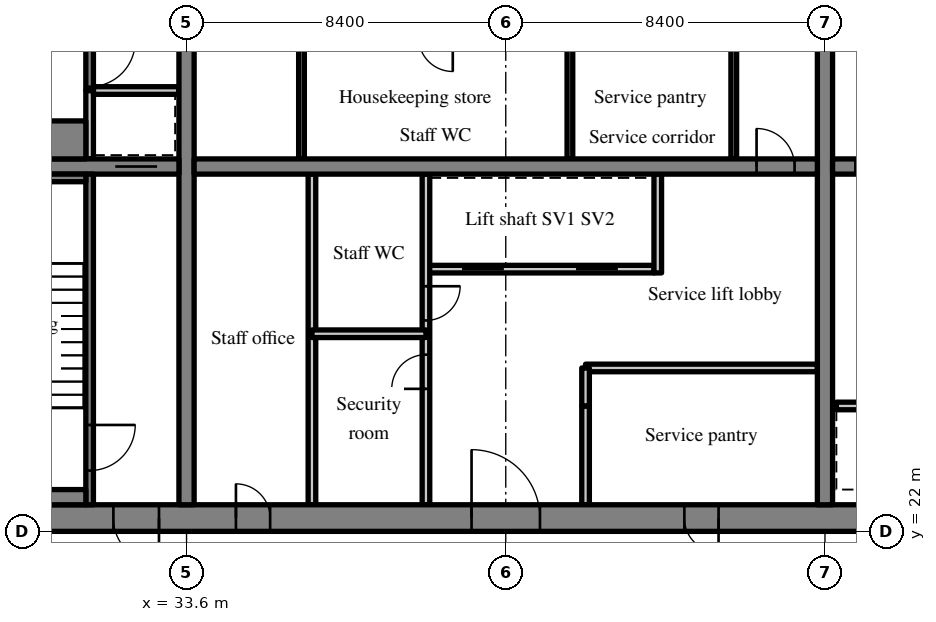
"""IFC4 building model, lengths in metres.
Left out: names, types, materials, properties, quantities, classifications, styles, units other than length and angle.
Written with IfcOpenShell. Run it as: python <this file> out.ifc"""

import sys

from ifc_helpers import new_model, si_unit, direction, frame, frame_2d, origin, place, context, subcontext, project, spatial, rectangle, extrude, source, transform, mapped, element, fill, save


model = new_model("IFC4")
c1 = context("Model", 3, precision=1e-05, world=origin(), true_north=direction((0.0, 1.0)))
c2 = subcontext(c1, "Body", "Model", "MODEL_VIEW")
j1 = project(units=[si_unit("LENGTHUNIT", "METRE"), si_unit("PLANEANGLEUNIT", "RADIAN")], contexts=[c1])
p1 = place(None, origin())
s1 = spatial("IfcSite", under=j1, at=p1, CompositionType="ELEMENT")
p2 = place(p1, origin())
s2 = spatial("IfcBuilding", under=s1, at=p2, CompositionType="ELEMENT")
p3 = place(p2, frame((0.0, 0.0, 185.8)))
s3 = spatial("IfcBuildingStorey", under=s2, at=p3, CompositionType="ELEMENT", Elevation=185.8)
m1 = source(origin(), c2, "Body", "SweptSolid", [
    extrude(rectangle(XDim=50.4, YDim=0.7, at=frame_2d((25.2, 0.0))), origin(), (0.0, 0.0, 1.0), 3.52),
])
p4 = place(p3, frame((25.2, 22.35, 0.0), z_axis=(0.0, 0.0, 1.0), x_axis=(1.0, 0.0, 0.0)))
e1 = element("IfcWall", 1, at=p4, inside=s3, PredefinedType="SHEAR", context=c2, shape_type="MappedRepresentation", body=[
    mapped(m1, transform((0.0, 0.0, 0.0), scale=1.0)),
])
m2 = source(origin(), c2, "Body", "SweptSolid", [
    extrude(rectangle(XDim=1.8, YDim=2.1, at=frame_2d((0.9, 1.05))), frame((0.0, 0.36, 0.0), z_axis=(0.0, -1.0, 0.0), x_axis=(1.0, 0.0, 0.0)), (0.0, 0.0, 1.0), 0.72),
])
p5 = place(p4, frame((15.9, 0.0, 0.0)))
e2 = element("IfcOpeningElement", 2, at=p5, cuts=e1, PredefinedType="OPENING", context=c2, shape_type="MappedRepresentation", body=[
    mapped(m2, transform((0.0, 0.0, 0.0), scale=1.0)),
])
m3 = source(origin(), c2, "Body", "SweptSolid", [
    extrude(rectangle(XDim=0.9, YDim=2.1, at=frame_2d((0.45, 1.05))), frame((0.0, 0.36, 0.0), z_axis=(0.0, -1.0, 0.0), x_axis=(1.0, 0.0, 0.0)), (0.0, 0.0, 1.0), 0.72),
])
p6 = place(p4, frame((9.7, 0.0, 0.0)))
e3 = element("IfcOpeningElement", 3, at=p6, cuts=e1, PredefinedType="OPENING", context=c2, shape_type="MappedRepresentation", body=[
    mapped(m3, transform((0.0, 0.0, 0.0), scale=1.0)),
])
p7 = place(p4, frame((21.5, 0.0, 0.0)))
e4 = element("IfcOpeningElement", 4, at=p7, cuts=e1, PredefinedType="OPENING", context=c2, shape_type="MappedRepresentation", body=[
    mapped(m3, transform((0.0, 0.0, 0.0), scale=1.0)),
])
p8 = place(p4, frame((32.7, 0.0, 0.0)))
e5 = element("IfcOpeningElement", 5, at=p8, cuts=e1, PredefinedType="OPENING", context=c2, shape_type="MappedRepresentation", body=[
    mapped(m2, transform((0.0, 0.0, 0.0), scale=1.0)),
])
m4 = source(origin(), c2, "Body", "SweptSolid", [
    extrude(rectangle(XDim=1.2, YDim=2.1, at=frame_2d((0.6, 1.05))), frame((0.0, 0.36, 0.0), z_axis=(0.0, -1.0, 0.0), x_axis=(1.0, 0.0, 0.0)), (0.0, 0.0, 1.0), 0.72),
])
p9 = place(p4, frame((6.475, 0.0, 0.0)))
e6 = element("IfcOpeningElement", 6, at=p9, cuts=e1, PredefinedType="OPENING", context=c2, shape_type="MappedRepresentation", body=[
    mapped(m4, transform((0.0, 0.0, 0.0), scale=1.0)),
])
p10 = place(p4, frame((47.875, 0.0, 0.0)))
e7 = element("IfcOpeningElement", 7, at=p10, cuts=e1, PredefinedType="OPENING", context=c2, shape_type="MappedRepresentation", body=[
    mapped(m4, transform((0.0, 0.0, 0.0), scale=1.0)),
])
m5 = source(origin(), c2, "Body", "SweptSolid", [
    extrude(rectangle(XDim=18.6, YDim=0.4, at=frame_2d((9.3, 0.0))), origin(), (0.0, 0.0, 1.0), 3.52),
])
p11 = place(p3, frame((33.6, 22.7, 0.0), z_axis=(0.0, 0.0, 1.0), x_axis=(0.0, 1.0, 0.0)))
e8 = element("IfcWall", 8, at=p11, inside=s3, PredefinedType="SHEAR", context=c2, shape_type="MappedRepresentation", body=[
    mapped(m5, transform((0.0, 0.0, 0.0), scale=1.0)),
])
m6 = source(origin(), c2, "Body", "SweptSolid", [
    extrude(rectangle(XDim=1.1, YDim=2.1, at=frame_2d((0.55, 1.05))), frame((0.0, 0.21, 0.0), z_axis=(0.0, -1.0, 0.0), x_axis=(1.0, 0.0, 0.0)), (0.0, 0.0, 1.0), 0.42),
])
p12 = place(p11, frame((12.75, 0.0, 0.0)))
e9 = element("IfcOpeningElement", 9, at=p12, cuts=e8, PredefinedType="OPENING", context=c2, shape_type="MappedRepresentation", body=[
    mapped(m6, transform((0.0, 0.0, 0.0), scale=1.0)),
])
p13 = place(p3, frame((50.4, 22.7, 0.0), z_axis=(0.0, 0.0, 1.0), x_axis=(0.0, 1.0, 0.0)))
e10 = element("IfcWall", 10, at=p13, inside=s3, PredefinedType="SHEAR", context=c2, shape_type="MappedRepresentation", body=[
    mapped(m5, transform((0.0, 0.0, 0.0), scale=1.0)),
])
p14 = place(p13, frame((12.75, 0.0, 0.0)))
e11 = element("IfcOpeningElement", 11, at=p14, cuts=e10, PredefinedType="OPENING", context=c2, shape_type="MappedRepresentation", body=[
    mapped(m6, transform((0.0, 0.0, 0.0), scale=1.0)),
])
m7 = source(origin(), c2, "Body", "SweptSolid", [
    extrude(rectangle(XDim=7.5, YDim=0.4, at=frame_2d((3.75, 0.0))), origin(), (0.0, 0.0, 1.0), 3.52),
])
p15 = place(p3, frame((25.9, 31.6, 0.0), z_axis=(0.0, 0.0, 1.0), x_axis=(1.0, 0.0, 0.0)))
e12 = element("IfcWall", 12, at=p15, inside=s3, PredefinedType="SHEAR", context=c2, shape_type="MappedRepresentation", body=[
    mapped(m7, transform((0.0, 0.0, 0.0), scale=1.0)),
])
p16 = place(p15, frame((5.825, 0.0, 0.0)))
e13 = element("IfcOpeningElement", 13, at=p16, cuts=e12, PredefinedType="OPENING", context=c2, shape_type="MappedRepresentation", body=[
    mapped(m6, transform((0.0, 0.0, 0.0), scale=1.0)),
])
m8 = source(origin(), c2, "Body", "SweptSolid", [
    extrude(rectangle(XDim=16.4, YDim=0.4, at=frame_2d((8.2, 0.0))), origin(), (0.0, 0.0, 1.0), 3.52),
])
p17 = place(p3, frame((33.8, 31.6, 0.0), z_axis=(0.0, 0.0, 1.0), x_axis=(1.0, 0.0, 0.0)))
e14 = element("IfcWall", 14, at=p17, inside=s3, PredefinedType="SHEAR", context=c2, shape_type="MappedRepresentation", body=[
    mapped(m8, transform((0.0, 0.0, 0.0), scale=1.0)),
])
m9 = source(origin(), c2, "Body", "SweptSolid", [
    extrude(rectangle(XDim=1.0, YDim=2.1, at=frame_2d((0.5, 1.05))), frame((0.0, 0.21, 0.0), z_axis=(0.0, -1.0, 0.0), x_axis=(1.0, 0.0, 0.0)), (0.0, 0.0, 1.0), 0.42),
])
p18 = place(p17, frame((14.8, 0.0, 0.0)))
e15 = element("IfcOpeningElement", 15, at=p18, cuts=e14, PredefinedType="OPENING", context=c2, shape_type="MappedRepresentation", body=[
    mapped(m9, transform((0.0, 0.0, 0.0), scale=1.0)),
])
p19 = place(p3, frame((50.6, 31.6, 0.0), z_axis=(0.0, 0.0, 1.0), x_axis=(1.0, 0.0, 0.0)))
e16 = element("IfcWall", 16, at=p19, inside=s3, PredefinedType="SHEAR", context=c2, shape_type="MappedRepresentation", body=[
    mapped(m8, transform((0.0, 0.0, 0.0), scale=1.0)),
])
p20 = place(p19, frame((0.6, 0.0, 0.0)))
e17 = element("IfcOpeningElement", 17, at=p20, cuts=e16, PredefinedType="OPENING", context=c2, shape_type="MappedRepresentation", body=[
    mapped(m9, transform((0.0, 0.0, 0.0), scale=1.0)),
])
m10 = source(origin(), c2, "Body", "SweptSolid", [
    extrude(rectangle(XDim=6.0, YDim=0.2, at=frame_2d((3.0, 0.0))), origin(), (0.0, 0.0, 1.0), 3.52),
])
p21 = place(p3, frame((39.9, 28.9, 0.0), z_axis=(0.0, 0.0, 1.0), x_axis=(1.0, 0.0, 0.0)))
e18 = element("IfcWall", 18, at=p21, inside=s3, PredefinedType="SOLIDWALL", context=c2, shape_type="MappedRepresentation", body=[
    mapped(m10, transform((0.0, 0.0, 0.0), scale=1.0)),
])
m11 = source(origin(), c2, "Body", "SweptSolid", [
    extrude(rectangle(XDim=1.1, YDim=2.1, at=frame_2d((0.55, 1.05))), frame((0.0, 0.11, 0.0), z_axis=(0.0, -1.0, 0.0), x_axis=(1.0, 0.0, 0.0)), (0.0, 0.0, 1.0), 0.22),
])
p22 = place(p21, frame((0.95, 0.0, 0.0)))
e19 = element("IfcOpeningElement", 19, at=p22, cuts=e18, PredefinedType="OPENING", context=c2, shape_type="MappedRepresentation", body=[
    mapped(m11, transform((0.0, 0.0, 0.0), scale=1.0)),
])
p23 = place(p21, frame((3.95, 0.0, 0.0)))
e20 = element("IfcOpeningElement", 20, at=p23, cuts=e18, PredefinedType="OPENING", context=c2, shape_type="MappedRepresentation", body=[
    mapped(m11, transform((0.0, 0.0, 0.0), scale=1.0)),
])
m12 = source(origin(), c2, "Body", "SweptSolid", [
    extrude(rectangle(XDim=8.7, YDim=0.2, at=frame_2d((4.35, 0.0))), origin(), (0.0, 0.0, 1.0), 3.52),
])
p24 = place(p3, frame((39.9, 22.7, 0.0), z_axis=(0.0, 0.0, 1.0), x_axis=(0.0, 1.0, 0.0)))
e21 = element("IfcWall", 21, at=p24, inside=s3, PredefinedType="PARTITIONING", context=c2, shape_type="MappedRepresentation", body=[
    mapped(m12, transform((0.0, 0.0, 0.0), scale=1.0)),
])
m13 = source(origin(), c2, "Body", "SweptSolid", [
    extrude(rectangle(XDim=0.9, YDim=2.1, at=frame_2d((0.45, 1.05))), frame((0.0, 0.11, 0.0), z_axis=(0.0, -1.0, 0.0), x_axis=(1.0, 0.0, 0.0)), (0.0, 0.0, 1.0), 0.22),
])
p25 = place(p24, frame((3.05, 0.0, 0.0)))
e22 = element("IfcOpeningElement", 22, at=p25, cuts=e21, PredefinedType="OPENING", context=c2, shape_type="MappedRepresentation", body=[
    mapped(m13, transform((0.0, 0.0, 0.0), scale=1.0)),
])
p26 = place(p24, frame((4.85, 0.0, 0.0)))
e23 = element("IfcOpeningElement", 23, at=p26, cuts=e21, PredefinedType="OPENING", context=c2, shape_type="MappedRepresentation", body=[
    mapped(m13, transform((0.0, 0.0, 0.0), scale=1.0)),
])
m14 = source(origin(), c2, "Body", "SweptSolid", [
    extrude(rectangle(XDim=2.6, YDim=0.2, at=frame_2d((1.3, 0.0))), origin(), (0.0, 0.0, 1.0), 3.52),
])
p27 = place(p3, frame((44.1, 22.7, 0.0), z_axis=(0.0, 0.0, 1.0), x_axis=(0.0, 1.0, 0.0)))
e24 = element("IfcWall", 24, at=p27, inside=s3, PredefinedType="PARTITIONING", context=c2, shape_type="MappedRepresentation", body=[
    mapped(m14, transform((0.0, 0.0, 0.0), scale=1.0)),
])
m15 = source(origin(), c2, "Body", "SweptSolid", [
    extrude(rectangle(XDim=2.6, YDim=0.2, at=frame_2d((1.3, 0.0))), origin(), (0.0, 0.0, 1.0), 3.52),
])
p28 = place(p3, frame((46.0, 28.8, 0.0), z_axis=(0.0, 0.0, 1.0), x_axis=(0.0, 1.0, 0.0)))
e25 = element("IfcWall", 25, at=p28, inside=s3, PredefinedType="SOLIDWALL", context=c2, shape_type="MappedRepresentation", body=[
    mapped(m15, transform((0.0, 0.0, 0.0), scale=1.0)),
])
p29 = place(p3, frame((36.9, 22.7, 0.0), z_axis=(0.0, 0.0, 1.0), x_axis=(0.0, 1.0, 0.0)))
e26 = element("IfcWall", 26, at=p29, inside=s3, PredefinedType="PARTITIONING", context=c2, shape_type="MappedRepresentation", body=[
    mapped(m12, transform((0.0, 0.0, 0.0), scale=1.0)),
])
m16 = source(origin(), c2, "Body", "SweptSolid", [
    extrude(rectangle(XDim=3.0, YDim=0.2, at=frame_2d((1.5, 0.0))), origin(), (0.0, 0.0, 1.0), 3.52),
])
p30 = place(p3, frame((36.9, 27.2, 0.0), z_axis=(0.0, 0.0, 1.0), x_axis=(1.0, 0.0, 0.0)))
e27 = element("IfcWall", 27, at=p30, inside=s3, PredefinedType="PARTITIONING", context=c2, shape_type="MappedRepresentation", body=[
    mapped(m16, transform((0.0, 0.0, 0.0), scale=1.0)),
])
m17 = source(origin(), c2, "Body", "SweptSolid", [
    extrude(rectangle(XDim=6.1, YDim=0.2, at=frame_2d((3.05, 0.0))), origin(), (0.0, 0.0, 1.0), 3.52),
])
p31 = place(p3, frame((44.1, 26.3, 0.0), z_axis=(0.0, 0.0, 1.0), x_axis=(1.0, 0.0, 0.0)))
e28 = element("IfcWall", 28, at=p31, inside=s3, PredefinedType="PARTITIONING", context=c2, shape_type="MappedRepresentation", body=[
    mapped(m17, transform((0.0, 0.0, 0.0), scale=1.0)),
])
m18 = source(origin(), c2, "Body", "SweptSolid", [
    extrude(rectangle(XDim=1.0, YDim=0.2, at=frame_2d((0.5, 0.0))), origin(), (0.0, 0.0, 1.0), 3.52),
])
p32 = place(p3, frame((44.1, 25.3, 0.0), z_axis=(0.0, 0.0, 1.0), x_axis=(0.0, 1.0, 0.0)))
e29 = element("IfcWall", 29, at=p32, inside=s3, PredefinedType="PARTITIONING", context=c2, shape_type="MappedRepresentation", body=[
    mapped(m18, transform((0.0, 0.0, 0.0), scale=1.0)),
])
m19 = source(origin(), c2, "Body", "SweptSolid", [
    extrude(rectangle(XDim=3.2, YDim=0.15, at=frame_2d((1.6, 0.0))), origin(), (0.0, 0.0, 1.0), 3.52),
])
for number, where, z_axis, x_axis in (
    (30, (48.0, 31.8, 0.0), (0.0, 0.0, 1.0), (0.0, 1.0, 0.0)),
    (31, (36.625, 31.8, 0.0), (0.0, 0.0, 1.0), (0.0, 1.0, 0.0)),
    (32, (43.688, 31.8, 0.0), (0.0, 0.0, 1.0), (0.0, 1.0, 0.0)),
):
    element("IfcWall", number, at=place(p3, frame(where, z_axis=z_axis, x_axis=x_axis)), inside=s3, PredefinedType="PARTITIONING", context=c2, shape_type="MappedRepresentation", body=[
        mapped(m19, transform((0.0, 0.0, 0.0), scale=1.0)),
    ])
p33 = place(p3, frame((56.7, 25.3, 0.0), z_axis=(0.0, 0.0, 1.0), x_axis=(-1.0, 0.0, 0.0)))
e33 = element("IfcWall", 33, at=p33, inside=s3, PredefinedType="SOLIDWALL", context=c2, shape_type="MappedRepresentation", body=[
    mapped(m10, transform((0.0, 0.0, 0.0), scale=1.0)),
])
p34 = place(p33, frame((0.95, 0.0, 0.0)))
e34 = element("IfcOpeningElement", 34, at=p34, cuts=e33, PredefinedType="OPENING", context=c2, shape_type="MappedRepresentation", body=[
    mapped(m11, transform((0.0, 0.0, 0.0), scale=1.0)),
])
p35 = place(p33, frame((3.95, 0.0, 0.0)))
e35 = element("IfcOpeningElement", 35, at=p35, cuts=e33, PredefinedType="OPENING", context=c2, shape_type="MappedRepresentation", body=[
    mapped(m11, transform((0.0, 0.0, 0.0), scale=1.0)),
])
m20 = source(origin(), c2, "Body", "SweptSolid", [
    extrude(rectangle(XDim=8.7, YDim=0.2, at=frame_2d((4.35, 0.0))), origin(), (0.0, 0.0, 1.0), 3.52),
])
p36 = place(p3, frame((31.05, 22.7, 0.0), z_axis=(0.0, 0.0, 1.0), x_axis=(0.0, 1.0, 0.0)))
e36 = element("IfcWall", 36, at=p36, inside=s3, PredefinedType="SOLIDWALL", context=c2, shape_type="MappedRepresentation", body=[
    mapped(m20, transform((0.0, 0.0, 0.0), scale=1.0)),
])
m21 = source(origin(), c2, "Body", "SweptSolid", [
    extrude(rectangle(XDim=1.2, YDim=2.1, at=frame_2d((0.6, 1.05))), frame((0.0, 0.11, 0.0), z_axis=(0.0, -1.0, 0.0), x_axis=(1.0, 0.0, 0.0)), (0.0, 0.0, 1.0), 0.22),
])
p37 = place(p36, frame((0.9, 0.0, 0.0)))
e37 = element("IfcOpeningElement", 37, at=p37, cuts=e36, PredefinedType="OPENING", context=c2, shape_type="MappedRepresentation", body=[
    mapped(m21, transform((0.0, 0.0, 0.0), scale=1.0)),
])
m22 = source(origin(), c2, "Body", "SweptSolid", [
    extrude(rectangle(XDim=1.8, YDim=0.2, at=frame_2d((0.9, 0.0))), origin(), (0.0, 0.0, 1.0), 3.52),
])
p38 = place(p3, frame((31.05, 31.8, 0.0), z_axis=(0.0, 0.0, 1.0), x_axis=(0.0, 1.0, 0.0)))
e38 = element("IfcWall", 38, at=p38, inside=s3, PredefinedType="SOLIDWALL", context=c2, shape_type="MappedRepresentation", body=[
    mapped(m22, transform((0.0, 0.0, 0.0), scale=1.0)),
])
m23 = source(origin(), c2, "Body", "SweptSolid", [
    extrude(rectangle(XDim=2.25, YDim=0.2, at=frame_2d((1.125, 0.0))), origin(), (0.0, 0.0, 1.0), 3.52),
])
p39 = place(p3, frame((31.15, 33.6, 0.0), z_axis=(0.0, 0.0, 1.0), x_axis=(1.0, 0.0, 0.0)))
e39 = element("IfcWall", 39, at=p39, inside=s3, PredefinedType="SOLIDWALL", context=c2, shape_type="MappedRepresentation", body=[
    mapped(m23, transform((0.0, 0.0, 0.0), scale=1.0)),
])
m24 = source(origin(), c2, "Body", "SweptSolid", [
    extrude(rectangle(XDim=7.7, YDim=0.2, at=frame_2d((3.85, 0.0))), origin(), (0.0, 0.0, 1.0), 3.52),
])
p40 = place(p3, frame((31.05, 33.6, 0.0), z_axis=(0.0, 0.0, 1.0), x_axis=(0.0, 1.0, 0.0)))
e40 = element("IfcWall", 40, at=p40, inside=s3, PredefinedType="SOLIDWALL", context=c2, shape_type="MappedRepresentation", body=[
    mapped(m24, transform((0.0, 0.0, 0.0), scale=1.0)),
])
p41 = place(p40, frame((0.1, 0.0, 0.0)))
e41 = element("IfcOpeningElement", 41, at=p41, cuts=e40, PredefinedType="OPENING", context=c2, shape_type="MappedRepresentation", body=[
    mapped(m21, transform((0.0, 0.0, 0.0), scale=1.0)),
])
m25 = source(origin(), c2, "Body", "SweptSolid", [
    extrude(rectangle(XDim=5.05, YDim=0.4, at=frame_2d((2.525, 0.0))), origin(), (0.0, 0.0, 1.0), 3.52),
])
p42 = place(p3, frame((25.9, 22.9, 0.0), z_axis=(0.0, 0.0, 1.0), x_axis=(1.0, 0.0, 0.0)))
e42 = element("IfcWall", 42, at=p42, inside=s3, PredefinedType="SOLIDWALL", context=c2, shape_type="MappedRepresentation", body=[
    mapped(m25, transform((0.0, 0.0, 0.0), scale=1.0)),
])
m26 = source(origin(), c2, "Body", "SweptSolid", [
    extrude(rectangle(XDim=5.05, YDim=0.2, at=frame_2d((2.525, 0.0))), origin(), (0.0, 0.0, 1.0), 3.52),
])
p43 = place(p3, frame((25.9, 31.3, 0.0), z_axis=(0.0, 0.0, 1.0), x_axis=(1.0, 0.0, 0.0)))
e43 = element("IfcWall", 43, at=p43, inside=s3, PredefinedType="SOLIDWALL", context=c2, shape_type="MappedRepresentation", body=[
    mapped(m26, transform((0.0, 0.0, 0.0), scale=1.0)),
])
m27 = source(origin(), c2, "Body", "SweptSolid", [
    extrude(rectangle(XDim=5.05, YDim=1.0, at=frame_2d((2.525, 0.0))), origin(), (0.0, 0.0, 1.0), 3.52),
])
p44 = place(p3, frame((25.9, 32.3, 0.0), z_axis=(0.0, 0.0, 1.0), x_axis=(1.0, 0.0, 0.0)))
e44 = element("IfcWall", 44, at=p44, inside=s3, PredefinedType="SOLIDWALL", context=c2, shape_type="MappedRepresentation", body=[
    mapped(m27, transform((0.0, 0.0, 0.0), scale=1.0)),
])
m28 = source(origin(), c2, "Body", "SweptSolid", [
    extrude(rectangle(XDim=1.8, YDim=2.1, at=frame_2d((0.9, 1.05))), frame((0.0, 0.275, 0.0), z_axis=(0.0, -1.0, 0.0), x_axis=(1.0, 0.0, 0.0)), (0.0, 0.0, 1.0), 0.05),
])
p45 = place(p5, origin())
e45 = element("IfcDoor", 45, at=p45, inside=s3, OperationType="DOUBLE_DOOR_SINGLE_SWING", PredefinedType="DOOR", context=c2, shape_type="MappedRepresentation", body=[
    mapped(m28, transform((0.0, 0.0, 0.0), scale=1.0)),
])
fill(e2, e45)
m29 = source(origin(), c2, "Body", "SweptSolid", [
    extrude(rectangle(XDim=1.0, YDim=2.1, at=frame_2d((0.5, 1.05))), frame((0.0, 0.025, 0.0), z_axis=(0.0, -1.0, 0.0), x_axis=(1.0, 0.0, 0.0)), (0.0, 0.0, 1.0), 0.05),
])
p46 = place(p18, origin())
e46 = element("IfcDoor", 46, at=p46, inside=s3, OperationType="SINGLE_SWING_LEFT", PredefinedType="DOOR", context=c2, shape_type="MappedRepresentation", body=[
    mapped(m29, transform((0.0, 0.0, 0.0), scale=1.0)),
])
fill(e15, e46)
m30 = source(origin(), c2, "Body", "SweptSolid", [
    extrude(rectangle(XDim=1.1, YDim=2.1, at=frame_2d((0.55, 1.05))), frame((0.0, 0.025, 0.0), z_axis=(0.0, -1.0, 0.0), x_axis=(1.0, 0.0, 0.0)), (0.0, 0.0, 1.0), 0.05),
])
p47 = place(p22, origin())
e47 = element("IfcDoor", 47, at=p47, inside=s3, OperationType="SLIDING_TO_LEFT", PredefinedType="DOOR", context=c2, shape_type="MappedRepresentation", body=[
    mapped(m30, transform((0.0, 0.0, 0.0), scale=1.0)),
])
fill(e19, e47)
p48 = place(p23, origin())
e48 = element("IfcDoor", 48, at=p48, inside=s3, OperationType="SLIDING_TO_RIGHT", PredefinedType="DOOR", context=c2, shape_type="MappedRepresentation", body=[
    mapped(m30, transform((0.0, 0.0, 0.0), scale=1.0)),
])
fill(e20, e48)
m31 = source(origin(), c2, "Body", "SweptSolid", [
    extrude(rectangle(XDim=0.9, YDim=2.1, at=frame_2d((0.45, 1.05))), frame((0.0, 0.275, 0.0), z_axis=(0.0, -1.0, 0.0), x_axis=(1.0, 0.0, 0.0)), (0.0, 0.0, 1.0), 0.05),
])
p49 = place(p6, origin())
e49 = element("IfcDoor", 49, at=p49, inside=s3, OperationType="SINGLE_SWING_LEFT", PredefinedType="DOOR", context=c2, shape_type="MappedRepresentation", body=[
    mapped(m31, transform((0.0, 0.0, 0.0), scale=1.0)),
])
fill(e3, e49)
m32 = source(origin(), c2, "Body", "SweptSolid", [
    extrude(rectangle(XDim=0.9, YDim=2.1, at=frame_2d((0.45, 1.05))), frame((0.0, 0.025, 0.0), z_axis=(0.0, -1.0, 0.0), x_axis=(1.0, 0.0, 0.0)), (0.0, 0.0, 1.0), 0.05),
])
p50 = place(p25, origin())
e50 = element("IfcDoor", 50, at=p50, inside=s3, OperationType="SINGLE_SWING_LEFT", PredefinedType="DOOR", context=c2, shape_type="MappedRepresentation", body=[
    mapped(m32, transform((0.0, 0.0, 0.0), scale=1.0)),
])
fill(e22, e50)
p51 = place(p26, origin())
e51 = element("IfcDoor", 51, at=p51, inside=s3, OperationType="SINGLE_SWING_RIGHT", PredefinedType="DOOR", context=c2, shape_type="MappedRepresentation", body=[
    mapped(m32, transform((0.0, 0.0, 0.0), scale=1.0)),
])
fill(e23, e51)
p52 = place(p7, origin())
e52 = element("IfcDoor", 52, at=p52, inside=s3, OperationType="SINGLE_SWING_RIGHT", PredefinedType="DOOR", context=c2, shape_type="MappedRepresentation", body=[
    mapped(m31, transform((0.0, 0.0, 0.0), scale=1.0)),
])
fill(e4, e52)
m33 = source(origin(), c2, "Body", "SweptSolid", [
    extrude(rectangle(XDim=1.2, YDim=2.1, at=frame_2d((0.6, 1.05))), frame((0.0, 0.025, 0.0), z_axis=(0.0, -1.0, 0.0), x_axis=(1.0, 0.0, 0.0)), (0.0, 0.0, 1.0), 0.05),
])
p53 = place(p37, origin())
e53 = element("IfcDoor", 53, at=p53, inside=s3, OperationType="SINGLE_SWING_RIGHT", PredefinedType="DOOR", context=c2, shape_type="MappedRepresentation", body=[
    mapped(m33, transform((0.0, 0.0, 0.0), scale=1.0)),
])
fill(e37, e53)
m34 = source(origin(), c2, "Body", "SweptSolid", [
    extrude(rectangle(XDim=1.2, YDim=2.1, at=frame_2d((0.6, 1.05))), frame((0.0, 0.275, 0.0), z_axis=(0.0, -1.0, 0.0), x_axis=(1.0, 0.0, 0.0)), (0.0, 0.0, 1.0), 0.05),
])
p54 = place(p9, origin())
e54 = element("IfcDoor", 54, at=p54, inside=s3, OperationType="SINGLE_SWING_RIGHT", PredefinedType="DOOR", context=c2, shape_type="MappedRepresentation", body=[
    mapped(m34, transform((0.0, 0.0, 0.0), scale=1.0)),
])
fill(e6, e54)
p55 = place(p16, origin())
e55 = element("IfcDoor", 55, at=p55, inside=s3, OperationType="SLIDING_TO_RIGHT", PredefinedType="DOOR", context=c2, shape_type="MappedRepresentation", body=[
    mapped(m30, transform((0.0, 0.0, 0.0), scale=1.0)),
])
fill(e13, e55)
p56 = place(p41, origin())
e56 = element("IfcDoor", 56, at=p56, inside=s3, OperationType="SINGLE_SWING_RIGHT", PredefinedType="DOOR", context=c2, shape_type="MappedRepresentation", body=[
    mapped(m33, transform((0.0, 0.0, 0.0), scale=1.0)),
])
fill(e41, e56)
save(model, sys.argv[1])
